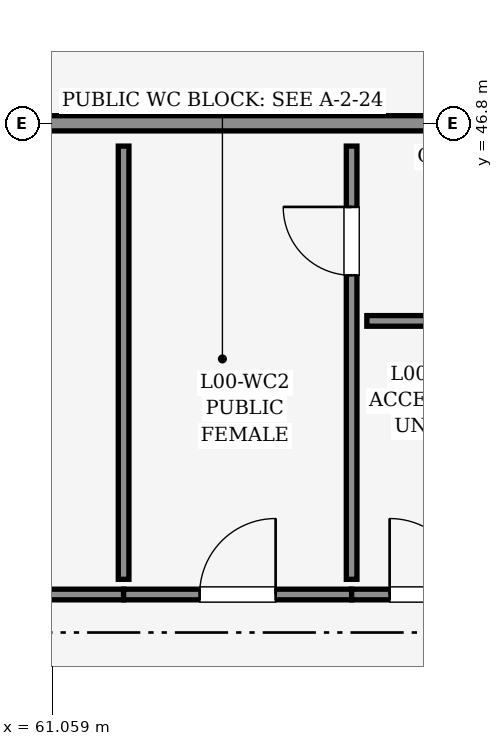
"""IFC4 building model, lengths in metres.
Left out: names, types, materials, properties, quantities, classifications, styles, units other than length and angle.
Written with IfcOpenShell. Run it as: python <this file> out.ifc"""

import sys

from ifc_helpers import new_model, si_unit, direction, frame, frame_2d, origin, place, context, subcontext, project, spatial, rectangle, extrude, element, fill, save


model = new_model("IFC4")
c1 = context("Model", 3, precision=1e-05, world=origin(), true_north=direction((0.0, 1.0)))
c2 = subcontext(c1, "Body", "Model", "MODEL_VIEW")
j1 = project(units=[si_unit("LENGTHUNIT", "METRE"), si_unit("PLANEANGLEUNIT", "RADIAN")], contexts=[c1])
p1 = place(None, origin())
s1 = spatial("IfcSite", under=j1, at=p1, CompositionType="ELEMENT")
p2 = place(p1, origin())
s2 = spatial("IfcBuilding", under=s1, at=p2, CompositionType="ELEMENT")
p3 = place(p2, origin())
s3 = spatial("IfcBuildingStorey", under=s2, at=p3, CompositionType="ELEMENT", Elevation=0.0)
p4 = place(p3, frame((59.2, 46.8, 0.0), z_axis=(0.0, 0.0, 1.0), x_axis=(1.0, 0.0, 0.0)))
e1 = element("IfcWall", 1, at=p4, inside=s3, PredefinedType="PARTITIONING", context=c2, shape_type="SweptSolid", body=[
    extrude(rectangle(XDim=7.6, YDim=0.2, at=frame_2d((3.8, 0.0))), origin(), (0.0, 0.0, 1.0), 4.325),
])
p5 = place(p3, frame((59.0, 40.6, 0.0), z_axis=(0.0, 0.0, 1.0), x_axis=(1.0, 0.0, 0.0)))
e2 = element("IfcWall", 2, at=p5, inside=s3, PredefinedType="PARTITIONING", context=c2, shape_type="SweptSolid", body=[
    extrude(rectangle(XDim=3.0, YDim=0.14, at=frame_2d((1.5, 0.0))), origin(), (0.0, 0.0, 1.0), 4.325),
])
p6 = place(p5, frame((1.0, 0.0, 0.0)))
e3 = element("IfcOpeningElement", 3, at=p6, cuts=e2, PredefinedType="OPENING", context=c2, shape_type="SweptSolid", body=[
    extrude(rectangle(XDim=1.0, YDim=2.1, at=frame_2d((0.5, 1.05))), frame((0.0, 0.08, 0.0), z_axis=(0.0, -1.0, 0.0), x_axis=(1.0, 0.0, 0.0)), (0.0, 0.0, 1.0), 0.16),
])
p7 = place(p3, frame((62.0, 40.6, 0.0), z_axis=(0.0, 0.0, 1.0), x_axis=(1.0, 0.0, 0.0)))
e4 = element("IfcWall", 4, at=p7, inside=s3, PredefinedType="PARTITIONING", context=c2, shape_type="SweptSolid", body=[
    extrude(rectangle(XDim=3.0, YDim=0.14, at=frame_2d((1.5, 0.0))), origin(), (0.0, 0.0, 1.0), 4.325),
])
p8 = place(p7, frame((1.0, 0.0, 0.0)))
e5 = element("IfcOpeningElement", 5, at=p8, cuts=e4, PredefinedType="OPENING", context=c2, shape_type="SweptSolid", body=[
    extrude(rectangle(XDim=1.0, YDim=2.1, at=frame_2d((0.5, 1.05))), frame((0.0, 0.08, 0.0), z_axis=(0.0, -1.0, 0.0), x_axis=(1.0, 0.0, 0.0)), (0.0, 0.0, 1.0), 0.16),
])
p9 = place(p3, frame((65.0, 40.6, 0.0), z_axis=(0.0, 0.0, 1.0), x_axis=(1.0, 0.0, 0.0)))
e6 = element("IfcWall", 6, at=p9, inside=s3, PredefinedType="PARTITIONING", context=c2, shape_type="SweptSolid", body=[
    extrude(rectangle(XDim=2.0, YDim=0.14, at=frame_2d((1.0, 0.0))), origin(), (0.0, 0.0, 1.0), 4.325),
])
p10 = place(p9, frame((0.5, 0.0, 0.0)))
e7 = element("IfcOpeningElement", 7, at=p10, cuts=e6, PredefinedType="OPENING", context=c2, shape_type="SweptSolid", body=[
    extrude(rectangle(XDim=1.0, YDim=2.1, at=frame_2d((0.5, 1.05))), frame((0.0, 0.08, 0.0), z_axis=(0.0, -1.0, 0.0), x_axis=(1.0, 0.0, 0.0)), (0.0, 0.0, 1.0), 0.16),
])
p11 = place(p3, frame((62.0, 40.8, 0.0), z_axis=(0.0, 0.0, 1.0), x_axis=(0.0, 1.0, 0.0)))
e8 = element("IfcWall", 8, at=p11, inside=s3, PredefinedType="PARTITIONING", context=c2, shape_type="SweptSolid", body=[
    extrude(rectangle(XDim=5.7, YDim=0.14, at=frame_2d((2.85, 0.0))), origin(), (0.0, 0.0, 1.0), 4.325),
])
p12 = place(p3, frame((65.0, 40.8, 0.0), z_axis=(0.0, 0.0, 1.0), x_axis=(0.0, 1.0, 0.0)))
e9 = element("IfcWall", 9, at=p12, inside=s3, PredefinedType="PARTITIONING", context=c2, shape_type="SweptSolid", body=[
    extrude(rectangle(XDim=5.7, YDim=0.14, at=frame_2d((2.85, 0.0))), origin(), (0.0, 0.0, 1.0), 4.325),
])
p13 = place(p12, frame((4.0, 0.0, 0.0)))
e10 = element("IfcOpeningElement", 10, at=p13, cuts=e9, PredefinedType="OPENING", context=c2, shape_type="SweptSolid", body=[
    extrude(rectangle(XDim=0.9, YDim=2.05, at=frame_2d((0.45, 1.025))), frame((0.0, 0.08, 0.0), z_axis=(0.0, -1.0, 0.0), x_axis=(1.0, 0.0, 0.0)), (0.0, 0.0, 1.0), 0.16),
])
p14 = place(p3, frame((65.2, 44.2, 0.0), z_axis=(0.0, 0.0, 1.0), x_axis=(1.0, 0.0, 0.0)))
e11 = element("IfcWall", 11, at=p14, inside=s3, PredefinedType="PARTITIONING", context=c2, shape_type="SweptSolid", body=[
    extrude(rectangle(XDim=1.8, YDim=0.14, at=frame_2d((0.9, 0.0))), origin(), (0.0, 0.0, 1.0), 4.325),
])
p15 = place(p8, origin())
e12 = element("IfcDoor", 12, at=p15, inside=s3, OperationType="SINGLE_SWING_RIGHT", PredefinedType="DOOR", context=c2, shape_type="SweptSolid", body=[
    extrude(rectangle(XDim=1.0, YDim=2.1, at=frame_2d((0.5, 1.05))), frame((0.0, 0.025, 0.0), z_axis=(0.0, -1.0, 0.0), x_axis=(1.0, 0.0, 0.0)), (0.0, 0.0, 1.0), 0.05),
])
fill(e5, e12)
p16 = place(p10, origin())
e13 = element("IfcDoor", 13, at=p16, inside=s3, OperationType="SINGLE_SWING_LEFT", PredefinedType="DOOR", context=c2, shape_type="SweptSolid", body=[
    extrude(rectangle(XDim=1.0, YDim=2.1, at=frame_2d((0.5, 1.05))), frame((0.0, 0.025, 0.0), z_axis=(0.0, -1.0, 0.0), x_axis=(1.0, 0.0, 0.0)), (0.0, 0.0, 1.0), 0.05),
])
fill(e7, e13)
p17 = place(p13, origin())
e14 = element("IfcDoor", 14, at=p17, inside=s3, OperationType="SINGLE_SWING_RIGHT", PredefinedType="DOOR", context=c2, shape_type="SweptSolid", body=[
    extrude(rectangle(XDim=0.9, YDim=2.05, at=frame_2d((0.45, 1.025))), frame((0.0, 0.025, 0.0), z_axis=(0.0, -1.0, 0.0), x_axis=(1.0, 0.0, 0.0)), (0.0, 0.0, 1.0), 0.05),
])
fill(e10, e14)
save(model, sys.argv[1])
